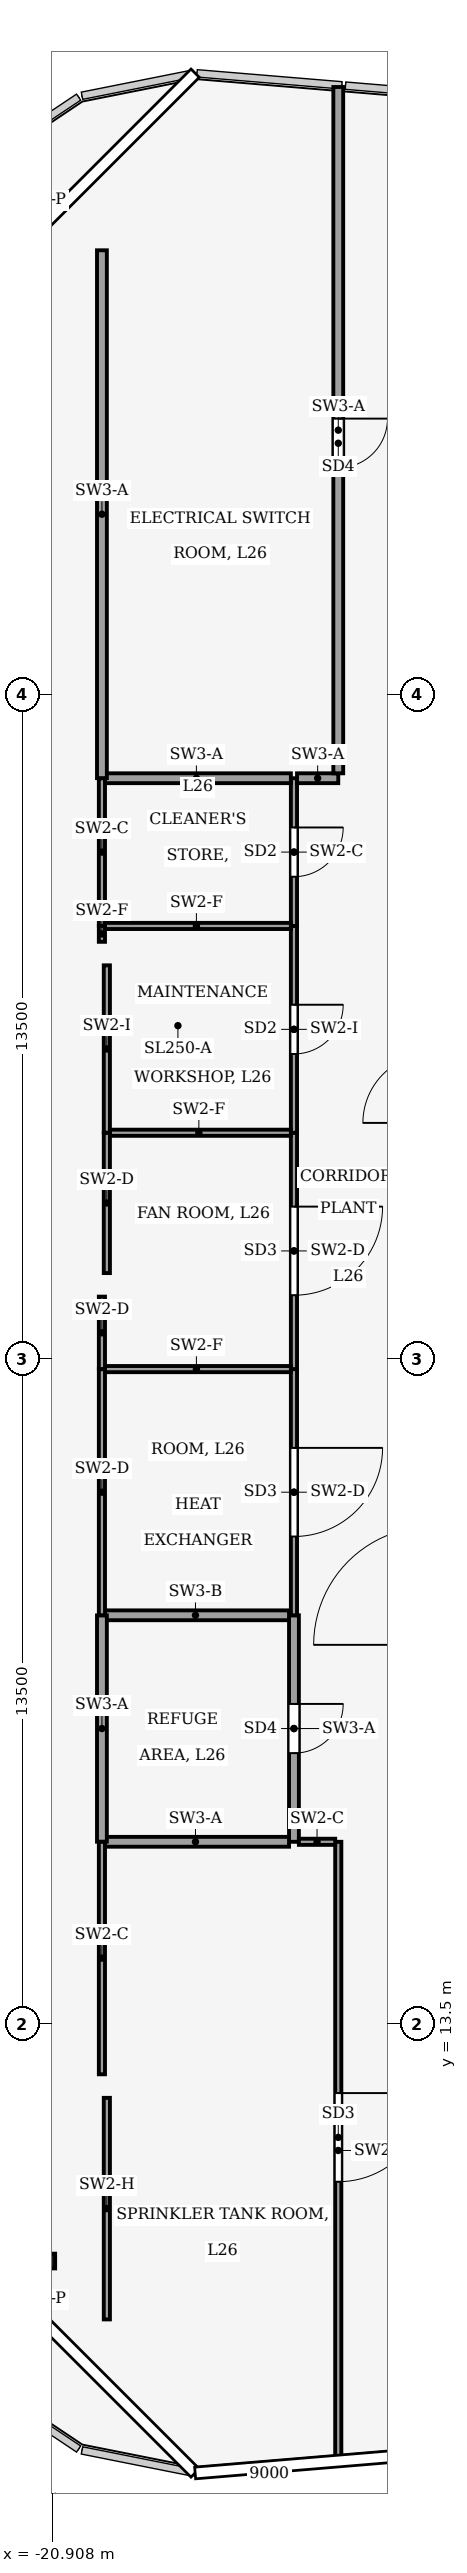
"""IFC4 building model, lengths in metres.
Left out: names, types, materials, properties, quantities, classifications, styles, units other than length and angle.
Written with IfcOpenShell. Run it as: python <this file> out.ifc"""

import sys

from ifc_helpers import new_model, si_unit, direction, frame, frame_2d, origin, origin_2d, place, context, subcontext, project, spatial, rectangle, hollow_rectangle, i_section, extrude, element, fill, save


model = new_model("IFC4")
c1 = context("Model", 3, precision=1e-05, world=origin(), true_north=direction((0.0, 1.0)))
c2 = subcontext(c1, "Body", "Model", "MODEL_VIEW")
j1 = project(units=[si_unit("LENGTHUNIT", "METRE"), si_unit("PLANEANGLEUNIT", "RADIAN")], contexts=[c1])
p1 = place(None, origin())
s1 = spatial("IfcSite", under=j1, at=p1, CompositionType="ELEMENT")
p2 = place(p1, origin())
s2 = spatial("IfcBuilding", under=s1, at=p2, CompositionType="ELEMENT")
p3 = place(p2, frame((0.0, 0.0, 114.0)))
s3 = spatial("IfcBuildingStorey", under=s2, at=p3, CompositionType="ELEMENT", Elevation=114.0)
p4 = place(p3, frame((-21.0, 50.0, 0.573), z_axis=(0.0, 0.8070371961, 0.590500604666), x_axis=(-1.0, 0.0, 0.0)))
e1 = element("IfcColumn", 1, at=p4, inside=s3, PredefinedType="COLUMN", context=c2, shape_type="SweptSolid", body=[
    extrude(hollow_rectangle(XDim=1.4, YDim=1.4, WallThickness=0.08, at=origin_2d()), origin(), (0.0, 0.0, 1.0), 9.913),
])
p5 = place(p3, frame((-21.0, 7.5, 0.431), z_axis=(0.0, 0.591280217963, 0.806466182704), x_axis=(-1.0, 0.0, 0.0)))
e2 = element("IfcColumn", 2, at=p5, inside=s3, PredefinedType="COLUMN", context=c2, shape_type="SweptSolid", body=[
    extrude(hollow_rectangle(XDim=1.4, YDim=1.4, WallThickness=0.08, at=origin_2d()), origin(), (0.0, 0.0, 1.0), 7.611),
])
p6 = place(p3, frame((-21.0, 28.75, 0.517), z_axis=(0.0, 0.723360676074, 0.690470370334), x_axis=(-1.0, 0.0, 0.0)))
e3 = element("IfcColumn", 3, at=p6, inside=s3, PredefinedType="COLUMN", context=c2, shape_type="SweptSolid", body=[
    extrude(hollow_rectangle(XDim=1.4, YDim=1.4, WallThickness=0.08, at=origin_2d()), origin(), (0.0, 0.0, 1.0), 8.64),
])
p7 = place(p3, frame((-21.0, 8.686, 3.437), z_axis=(0.0, 0.0, 1.0), x_axis=(1.0, 0.0, 0.0)))
e4 = element("IfcColumn", 4, at=p7, inside=s3, PredefinedType="COLUMN", context=c2, shape_type="SweptSolid", body=[
    extrude(i_section(OverallWidth=0.3, OverallDepth=0.3, WebThickness=0.011, FlangeThickness=0.019, FilletRadius=0.027, at=origin_2d()), origin(), (0.0, 0.0, 1.0), 3.263),
])
p8 = place(p3, frame((-16.0, 21.8, 0.0), z_axis=(0.0, 0.0, 1.0), x_axis=(0.0, -1.0, 0.0)))
e5 = element("IfcWall", 5, at=p8, inside=s3, PredefinedType="PARTITIONING", context=c2, shape_type="SweptSolid", body=[
    extrude(rectangle(XDim=4.6, YDim=0.2, at=frame_2d((2.3, 0.0))), origin(), (0.0, 0.0, 1.0), 6.14),
])
p9 = place(p8, frame((1.8, 0.0, 0.0)))
e6 = element("IfcOpeningElement", 6, at=p9, cuts=e5, PredefinedType="OPENING", context=c2, shape_type="SweptSolid", body=[
    extrude(rectangle(XDim=1.0, YDim=2.1, at=frame_2d((0.5, 1.05))), frame((0.0, 0.11, 0.0), z_axis=(0.0, -1.0, 0.0), x_axis=(1.0, 0.0, 0.0)), (0.0, 0.0, 1.0), 0.22),
])
p10 = place(p3, frame((-16.0, 26.8, 0.0), z_axis=(0.0, 0.0, 1.0), x_axis=(0.0, -1.0, 0.0)))
e7 = element("IfcWall", 7, at=p10, inside=s3, PredefinedType="PARTITIONING", context=c2, shape_type="SweptSolid", body=[
    extrude(rectangle(XDim=5.0, YDim=0.125, at=frame_2d((2.5, 0.0))), origin(), (0.0, 0.0, 1.0), 6.44),
])
p11 = place(p10, frame((1.6, 0.0, 0.0)))
e8 = element("IfcOpeningElement", 8, at=p11, cuts=e7, PredefinedType="OPENING", context=c2, shape_type="SweptSolid", body=[
    extrude(rectangle(XDim=1.8, YDim=2.4, at=frame_2d((0.9, 1.2))), frame((0.0, 0.073, 0.0), z_axis=(0.0, -1.0, 0.0), x_axis=(1.0, 0.0, 0.0)), (0.0, 0.0, 1.0), 0.145),
])
p12 = place(p3, frame((-16.0, 31.6, 0.0), z_axis=(0.0, 0.0, 1.0), x_axis=(0.0, -1.0, 0.0)))
e9 = element("IfcWall", 9, at=p12, inside=s3, PredefinedType="PARTITIONING", context=c2, shape_type="SweptSolid", body=[
    extrude(rectangle(XDim=4.8, YDim=0.125, at=frame_2d((2.4, 0.0))), origin(), (0.0, 0.0, 1.0), 6.44),
])
p13 = place(p12, frame((1.5, 0.0, 0.0)))
e10 = element("IfcOpeningElement", 10, at=p13, cuts=e9, PredefinedType="OPENING", context=c2, shape_type="SweptSolid", body=[
    extrude(rectangle(XDim=1.8, YDim=2.4, at=frame_2d((0.9, 1.2))), frame((0.0, 0.073, 0.0), z_axis=(0.0, -1.0, 0.0), x_axis=(1.0, 0.0, 0.0)), (0.0, 0.0, 1.0), 0.145),
])
p14 = place(p3, frame((-16.0, 35.8, 0.0), z_axis=(0.0, 0.0, 1.0), x_axis=(0.0, -1.0, 0.0)))
e11 = element("IfcWall", 11, at=p14, inside=s3, PredefinedType="PARTITIONING", context=c2, shape_type="SweptSolid", body=[
    extrude(rectangle(XDim=4.2, YDim=0.125, at=frame_2d((2.1, 0.0))), origin(), (0.0, 0.0, 1.0), 6.48),
])
p15 = place(p14, frame((1.6, 0.0, 0.0)))
e12 = element("IfcOpeningElement", 12, at=p15, cuts=e11, PredefinedType="OPENING", context=c2, shape_type="SweptSolid", body=[
    extrude(rectangle(XDim=1.0, YDim=2.1, at=frame_2d((0.5, 1.05))), frame((0.0, 0.073, 0.0), z_axis=(0.0, -1.0, 0.0), x_axis=(1.0, 0.0, 0.0)), (0.0, 0.0, 1.0), 0.145),
])
p16 = place(p3, frame((-16.0, 38.8, 0.0), z_axis=(0.0, 0.0, 1.0), x_axis=(0.0, -1.0, 0.0)))
e13 = element("IfcWall", 13, at=p16, inside=s3, PredefinedType="PARTITIONING", context=c2, shape_type="SweptSolid", body=[
    extrude(rectangle(XDim=3.0, YDim=0.125, at=frame_2d((1.5, 0.0))), origin(), (0.0, 0.0, 1.0), 6.14),
])
p17 = place(p16, frame((1.0, 0.0, 0.0)))
e14 = element("IfcOpeningElement", 14, at=p17, cuts=e13, PredefinedType="OPENING", context=c2, shape_type="SweptSolid", body=[
    extrude(rectangle(XDim=1.0, YDim=2.1, at=frame_2d((0.5, 1.05))), frame((0.0, 0.073, 0.0), z_axis=(0.0, -1.0, 0.0), x_axis=(1.0, 0.0, 0.0)), (0.0, 0.0, 1.0), 0.145),
])
p18 = place(p3, frame((-15.1, 17.2, 0.0), z_axis=(0.0, 0.0, 1.0), x_axis=(0.0, -1.0, 0.0)))
e15 = element("IfcWall", 15, at=p18, inside=s3, PredefinedType="PARTITIONING", context=c2, shape_type="SweptSolid", body=[
    extrude(rectangle(XDim=12.538, YDim=0.125, at=frame_2d((6.269, 0.0))), origin(), (0.0, 0.0, 1.0), 6.04),
])
p19 = place(p18, frame((5.104, 0.0, 0.0)))
e16 = element("IfcOpeningElement", 16, at=p19, cuts=e15, PredefinedType="OPENING", context=c2, shape_type="SweptSolid", body=[
    extrude(rectangle(XDim=1.8, YDim=2.4, at=frame_2d((0.9, 1.2))), frame((0.0, 0.073, 0.0), z_axis=(0.0, -1.0, 0.0), x_axis=(1.0, 0.0, 0.0)), (0.0, 0.0, 1.0), 0.145),
])
p20 = place(p3, frame((-15.163, 17.2, 0.0), z_axis=(0.0, 0.0, 1.0), x_axis=(-1.0, 0.0, 0.0)))
e17 = element("IfcWall", 17, at=p20, inside=s3, PredefinedType="PARTITIONING", context=c2, shape_type="SweptSolid", body=[
    extrude(rectangle(XDim=0.737, YDim=0.125, at=frame_2d((0.369, 0.0))), origin(), (0.0, 0.0, 1.0), 6.14),
])
p21 = place(p3, frame((-15.938, 38.8, 0.0), z_axis=(0.0, 0.0, 1.0), x_axis=(1.0, 0.0, 0.0)))
e18 = element("IfcWall", 18, at=p21, inside=s3, PredefinedType="PARTITIONING", context=c2, shape_type="SweptSolid", body=[
    extrude(rectangle(XDim=0.837, YDim=0.2, at=frame_2d((0.419, 0.0))), origin(), (0.0, 0.0, 1.0), 6.14),
])
p22 = place(p3, frame((-15.1, 52.838, 0.0), z_axis=(0.0, 0.0, 1.0), x_axis=(0.0, -1.0, 0.0)))
e19 = element("IfcWall", 19, at=p22, inside=s3, PredefinedType="PARTITIONING", context=c2, shape_type="SweptSolid", body=[
    extrude(rectangle(XDim=13.938, YDim=0.2, at=frame_2d((6.969, 0.0))), origin(), (0.0, 0.0, 1.0), 6.14),
])
p23 = place(p22, frame((6.735, 0.0, 0.0)))
e20 = element("IfcOpeningElement", 20, at=p23, cuts=e19, PredefinedType="OPENING", context=c2, shape_type="SweptSolid", body=[
    extrude(rectangle(XDim=1.0, YDim=2.1, at=frame_2d((0.5, 1.05))), frame((0.0, 0.11, 0.0), z_axis=(0.0, -1.0, 0.0), x_axis=(1.0, 0.0, 0.0)), (0.0, 0.0, 1.0), 0.22),
])
p24 = place(p3, frame((-19.9, 21.8, 0.0), z_axis=(0.0, 0.0, 1.0), x_axis=(1.0, 0.0, 0.0)))
e21 = element("IfcWall", 21, at=p24, inside=s3, PredefinedType="PARTITIONING", context=c2, shape_type="SweptSolid", body=[
    extrude(rectangle(XDim=3.8, YDim=0.2, at=frame_2d((1.9, 0.0))), origin(), (0.0, 0.0, 1.0), 6.87),
])
p25 = place(p3, frame((-16.1, 17.2, 0.0), z_axis=(0.0, 0.0, 1.0), x_axis=(-1.0, 0.0, 0.0)))
e22 = element("IfcWall", 22, at=p25, inside=s3, PredefinedType="PARTITIONING", context=c2, shape_type="SweptSolid", body=[
    extrude(rectangle(XDim=3.8, YDim=0.2, at=frame_2d((1.9, 0.0))), origin(), (0.0, 0.0, 1.0), 6.14),
])
p26 = place(p3, frame((-19.9, 26.8, 0.0), z_axis=(0.0, 0.0, 1.0), x_axis=(1.0, 0.0, 0.0)))
e23 = element("IfcWall", 23, at=p26, inside=s3, PredefinedType="PARTITIONING", context=c2, shape_type="SweptSolid", body=[
    extrude(rectangle(XDim=3.837, YDim=0.125, at=frame_2d((1.919, 0.0))), origin(), (0.0, 0.0, 1.0), 6.87),
])
p27 = place(p3, frame((-19.8, 31.6, 0.0), z_axis=(0.0, 0.0, 1.0), x_axis=(1.0, 0.0, 0.0)))
e24 = element("IfcWall", 24, at=p27, inside=s3, PredefinedType="PARTITIONING", context=c2, shape_type="SweptSolid", body=[
    extrude(rectangle(XDim=3.738, YDim=0.125, at=frame_2d((1.869, 0.0))), origin(), (0.0, 0.0, 1.0), 6.87),
])
p28 = place(p3, frame((-19.9, 35.8, 0.0), z_axis=(0.0, 0.0, 1.0), x_axis=(1.0, 0.0, 0.0)))
e25 = element("IfcWall", 25, at=p28, inside=s3, PredefinedType="PARTITIONING", context=c2, shape_type="SweptSolid", body=[
    extrude(rectangle(XDim=3.837, YDim=0.125, at=frame_2d((1.919, 0.0))), origin(), (0.0, 0.0, 1.0), 6.87),
])
p29 = place(p3, frame((-19.9, 38.8, 0.0), z_axis=(0.0, 0.0, 1.0), x_axis=(1.0, 0.0, 0.0)))
e26 = element("IfcWall", 26, at=p29, inside=s3, PredefinedType="PARTITIONING", context=c2, shape_type="SweptSolid", body=[
    extrude(rectangle(XDim=3.837, YDim=0.2, at=frame_2d((1.919, 0.0))), origin(), (0.0, 0.0, 1.0), 6.14),
])
p30 = place(p3, frame((-19.9, 17.202, 0.0), z_axis=(0.0, 0.0, 1.0), x_axis=(0.0, 1.0, 0.0)))
e27 = element("IfcWall", 27, at=p30, inside=s3, PredefinedType="PARTITIONING", context=c2, shape_type="SweptSolid", body=[
    extrude(rectangle(XDim=4.596, YDim=0.2, at=frame_2d((2.298, 0.0))), origin(), (0.0, 0.0, 1.0), 6.14),
])
p31 = place(p3, frame((-19.9, 21.802, 0.0), z_axis=(0.0, 0.0, 1.0), x_axis=(0.0, 1.0, 0.0)))
e28 = element("IfcWall", 28, at=p31, inside=s3, PredefinedType="PARTITIONING", context=c2, shape_type="SweptSolid", body=[
    extrude(rectangle(XDim=4.996, YDim=0.125, at=frame_2d((2.498, 0.0))), origin(), (0.0, 0.0, 1.0), 6.44),
])
p32 = place(p3, frame((-19.9, 26.802, 0.0), z_axis=(0.0, 0.0, 1.0), x_axis=(0.0, 1.0, 0.0)))
e29 = element("IfcWall", 29, at=p32, inside=s3, PredefinedType="PARTITIONING", context=c2, shape_type="SweptSolid", body=[
    extrude(rectangle(XDim=1.47, YDim=0.125, at=frame_2d((0.735, 0.0))), origin(), (0.0, 0.0, 1.0), 6.44),
])
p33 = place(p3, frame((-19.8, 28.75, 0.0), z_axis=(0.0, 0.0, 1.0), x_axis=(0.0, 1.0, 0.0)))
e30 = element("IfcWall", 30, at=p33, inside=s3, PredefinedType="PARTITIONING", context=c2, shape_type="SweptSolid", body=[
    extrude(rectangle(XDim=2.848, YDim=0.125, at=frame_2d((1.424, 0.0))), origin(), (0.0, 0.0, 1.0), 6.44),
])
p34 = place(p3, frame((-19.8, 31.602, 0.0), z_axis=(0.0, 0.0, 1.0), x_axis=(0.0, 1.0, 0.0)))
e31 = element("IfcWall", 31, at=p34, inside=s3, PredefinedType="PARTITIONING", context=c2, shape_type="SweptSolid", body=[
    extrude(rectangle(XDim=3.398, YDim=0.125, at=frame_2d((1.699, 0.0))), origin(), (0.0, 0.0, 1.0), 6.48),
])
p35 = place(p3, frame((-19.9, 35.478, 0.0), z_axis=(0.0, 0.0, 1.0), x_axis=(0.0, 1.0, 0.0)))
e32 = element("IfcWall", 32, at=p35, inside=s3, PredefinedType="PARTITIONING", context=c2, shape_type="SweptSolid", body=[
    extrude(rectangle(XDim=0.32, YDim=0.125, at=frame_2d((0.16, 0.0))), origin(), (0.0, 0.0, 1.0), 6.87),
])
p36 = place(p3, frame((-19.9, 35.802, 0.0), z_axis=(0.0, 0.0, 1.0), x_axis=(0.0, 1.0, 0.0)))
e33 = element("IfcWall", 33, at=p36, inside=s3, PredefinedType="PARTITIONING", context=c2, shape_type="SweptSolid", body=[
    extrude(rectangle(XDim=2.996, YDim=0.125, at=frame_2d((1.498, 0.0))), origin(), (0.0, 0.0, 1.0), 6.14),
])
p37 = place(p3, frame((-19.8, 7.5, 0.0), z_axis=(0.0, 0.0, 1.0), x_axis=(0.0, 1.0, 0.0)))
e34 = element("IfcWall", 34, at=p37, inside=s3, PredefinedType="PARTITIONING", context=c2, shape_type="SweptSolid", body=[
    extrude(rectangle(XDim=4.5, YDim=0.125, at=frame_2d((2.25, 0.0))), origin(), (0.0, 0.0, 1.0), 5.93),
])
p38 = place(p3, frame((-19.9, 12.478, 0.0), z_axis=(0.0, 0.0, 1.0), x_axis=(0.0, 1.0, 0.0)))
e35 = element("IfcWall", 35, at=p38, inside=s3, PredefinedType="PARTITIONING", context=c2, shape_type="SweptSolid", body=[
    extrude(rectangle(XDim=4.72, YDim=0.125, at=frame_2d((2.36, 0.0))), origin(), (0.0, 0.0, 1.0), 6.14),
])
p39 = place(p3, frame((-19.9, 38.802, 0.0), z_axis=(0.0, 0.0, 1.0), x_axis=(0.0, 1.0, 0.0)))
e36 = element("IfcWall", 36, at=p39, inside=s3, PredefinedType="PARTITIONING", context=c2, shape_type="SweptSolid", body=[
    extrude(rectangle(XDim=10.72, YDim=0.2, at=frame_2d((5.36, 0.0))), origin(), (0.0, 0.0, 1.0), 6.14),
])
p40 = place(p9, origin())
e37 = element("IfcDoor", 37, at=p40, inside=s3, OperationType="SINGLE_SWING_RIGHT", PredefinedType="DOOR", context=c2, shape_type="SweptSolid", body=[
    extrude(rectangle(XDim=1.0, YDim=2.1, at=frame_2d((0.5, 1.05))), frame((0.0, 0.025, 0.0), z_axis=(0.0, -1.0, 0.0), x_axis=(1.0, 0.0, 0.0)), (0.0, 0.0, 1.0), 0.05),
])
fill(e6, e37)
p41 = place(p11, origin())
e38 = element("IfcDoor", 38, at=p41, inside=s3, OperationType="DOUBLE_DOOR_SINGLE_SWING", PredefinedType="DOOR", context=c2, shape_type="SweptSolid", body=[
    extrude(rectangle(XDim=1.8, YDim=2.4, at=frame_2d((0.9, 1.2))), frame((0.0, 0.025, 0.0), z_axis=(0.0, -1.0, 0.0), x_axis=(1.0, 0.0, 0.0)), (0.0, 0.0, 1.0), 0.05),
])
fill(e8, e38)
p42 = place(p13, origin())
e39 = element("IfcDoor", 39, at=p42, inside=s3, OperationType="DOUBLE_DOOR_SINGLE_SWING", PredefinedType="DOOR", context=c2, shape_type="SweptSolid", body=[
    extrude(rectangle(XDim=1.8, YDim=2.4, at=frame_2d((0.9, 1.2))), frame((0.0, 0.025, 0.0), z_axis=(0.0, -1.0, 0.0), x_axis=(1.0, 0.0, 0.0)), (0.0, 0.0, 1.0), 0.05),
])
fill(e10, e39)
p43 = place(p15, origin())
e40 = element("IfcDoor", 40, at=p43, inside=s3, OperationType="SINGLE_SWING_LEFT", PredefinedType="DOOR", context=c2, shape_type="SweptSolid", body=[
    extrude(rectangle(XDim=1.0, YDim=2.1, at=frame_2d((0.5, 1.05))), frame((0.0, 0.025, 0.0), z_axis=(0.0, -1.0, 0.0), x_axis=(1.0, 0.0, 0.0)), (0.0, 0.0, 1.0), 0.05),
])
fill(e12, e40)
p44 = place(p17, origin())
e41 = element("IfcDoor", 41, at=p44, inside=s3, OperationType="SINGLE_SWING_RIGHT", PredefinedType="DOOR", context=c2, shape_type="SweptSolid", body=[
    extrude(rectangle(XDim=1.0, YDim=2.1, at=frame_2d((0.5, 1.05))), frame((0.0, 0.025, 0.0), z_axis=(0.0, -1.0, 0.0), x_axis=(1.0, 0.0, 0.0)), (0.0, 0.0, 1.0), 0.05),
])
fill(e14, e41)
p45 = place(p19, origin())
e42 = element("IfcDoor", 42, at=p45, inside=s3, OperationType="DOUBLE_DOOR_SINGLE_SWING", PredefinedType="DOOR", context=c2, shape_type="SweptSolid", body=[
    extrude(rectangle(XDim=1.8, YDim=2.4, at=frame_2d((0.9, 1.2))), frame((0.0, 0.025, 0.0), z_axis=(0.0, -1.0, 0.0), x_axis=(1.0, 0.0, 0.0)), (0.0, 0.0, 1.0), 0.05),
])
fill(e16, e42)
p46 = place(p23, origin())
e43 = element("IfcDoor", 43, at=p46, inside=s3, OperationType="SINGLE_SWING_RIGHT", PredefinedType="DOOR", context=c2, shape_type="SweptSolid", body=[
    extrude(rectangle(XDim=1.0, YDim=2.1, at=frame_2d((0.5, 1.05))), frame((0.0, 0.025, 0.0), z_axis=(0.0, -1.0, 0.0), x_axis=(1.0, 0.0, 0.0)), (0.0, 0.0, 1.0), 0.05),
])
fill(e20, e43)
save(model, sys.argv[1])
